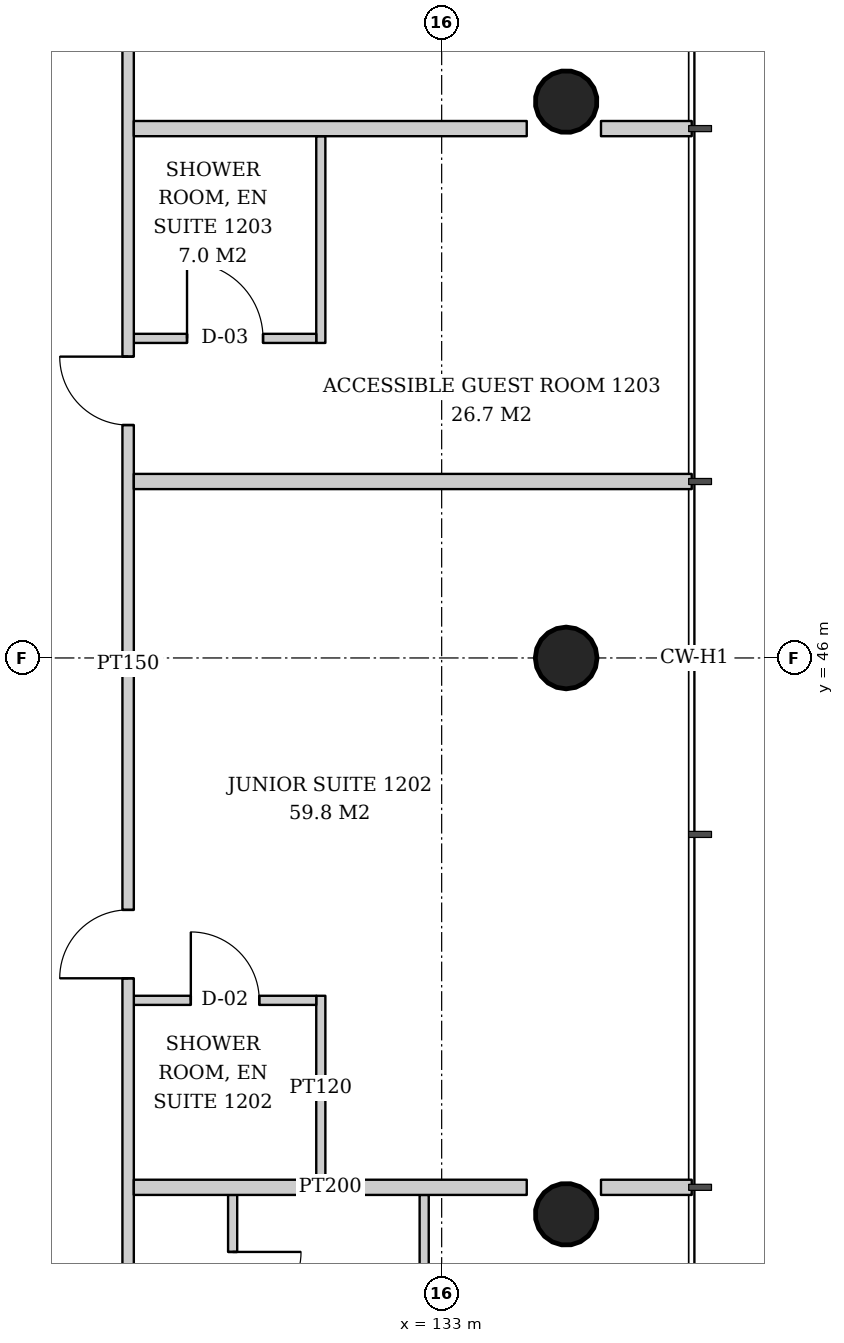
"""IFC4 building model, lengths in metres.
Left out: names, types, materials, properties, quantities, classifications, styles, units other than length and angle.
Written with IfcOpenShell. Run it as: python <this file> out.ifc"""

import sys

from ifc_helpers import new_model, si_unit, direction, frame, frame_2d, origin, origin_2d, place, context, subcontext, project, spatial, rectangle, hollow_circle, extrude, element, fill, save


model = new_model("IFC4")
c1 = context("Model", 3, precision=1e-05, world=origin(), true_north=direction((0.0, 1.0)))
c2 = subcontext(c1, "Body", "Model", "MODEL_VIEW")
j1 = project(units=[si_unit("LENGTHUNIT", "METRE"), si_unit("PLANEANGLEUNIT", "RADIAN")], contexts=[c1])
p1 = place(None, origin())
s1 = spatial("IfcSite", under=j1, at=p1, CompositionType="ELEMENT")
p2 = place(p1, origin())
s2 = spatial("IfcBuilding", under=s1, at=p2, CompositionType="ELEMENT")
p3 = place(p2, frame((0.0, 0.0, 51.4)))
s3 = spatial("IfcBuildingStorey", under=s2, at=p3, CompositionType="ELEMENT", Elevation=51.4)
p4 = place(p3, frame((134.69, 38.655, 0.0), z_axis=(-0.043059584825, 0.021497706284, 0.998841188968), x_axis=(-0.446680166538, -0.894693706707, 0.0)))
e1 = element("IfcColumn", 1, at=p4, inside=s3, PredefinedType="COLUMN", context=c2, shape_type="SweptSolid", body=[
    extrude(hollow_circle(Radius=0.406, WallThickness=0.03, at=origin_2d()), origin(), (0.0, 0.0, 1.0), 3.804),
])
p5 = place(p3, frame((134.69, 46.0, 0.0), z_axis=(-0.043069538298, 0.0, 0.999072076915), x_axis=(0.0, -1.0, 0.0)))
e2 = element("IfcColumn", 2, at=p5, inside=s3, PredefinedType="COLUMN", context=c2, shape_type="SweptSolid", body=[
    extrude(hollow_circle(Radius=0.406, WallThickness=0.03, at=origin_2d()), origin(), (0.0, 0.0, 1.0), 3.803),
])
p6 = place(p3, frame((134.69, 53.345, 0.0), z_axis=(-0.043059584825, -0.021497706284, 0.998841188968), x_axis=(0.446680166538, -0.894693706707, 0.0)))
e3 = element("IfcColumn", 3, at=p6, inside=s3, PredefinedType="COLUMN", context=c2, shape_type="SweptSolid", body=[
    extrude(hollow_circle(Radius=0.406, WallThickness=0.03, at=origin_2d()), origin(), (0.0, 0.0, 1.0), 3.804),
])
p7 = place(p3, frame((130.25, 38.936, 0.0), z_axis=(0.0, 0.0, 1.0), x_axis=(0.0, -1.0, 0.0)))
e4 = element("IfcWall", 4, at=p7, inside=s3, PredefinedType="PARTITIONING", context=c2, shape_type="SweptSolid", body=[
    extrude(rectangle(XDim=2.58, YDim=0.12, at=frame_2d((1.29, 0.0))), origin(), (0.0, 0.0, 1.0), 2.8),
])
p8 = place(p7, frame((0.75, 0.0, 0.0)))
e5 = element("IfcOpeningElement", 5, at=p8, cuts=e4, PredefinedType="OPENING", context=c2, shape_type="SweptSolid", body=[
    extrude(rectangle(XDim=0.9, YDim=2.1, at=frame_2d((0.45, 1.05))), frame((0.0, 0.07, 0.0), z_axis=(0.0, -1.0, 0.0), x_axis=(1.0, 0.0, 0.0)), (0.0, 0.0, 1.0), 0.14),
])
p9 = place(p3, frame((132.77, 38.936, 0.0), z_axis=(0.0, 0.0, 1.0), x_axis=(0.0, -1.0, 0.0)))
e6 = element("IfcWall", 6, at=p9, inside=s3, PredefinedType="PARTITIONING", context=c2, shape_type="SweptSolid", body=[
    extrude(rectangle(XDim=2.58, YDim=0.12, at=frame_2d((1.29, 0.0))), origin(), (0.0, 0.0, 1.0), 2.8),
])
p10 = place(p3, frame((131.41, 39.136, 0.0), z_axis=(0.0, 0.0, 1.0), x_axis=(0.0, 1.0, 0.0)))
e7 = element("IfcWall", 7, at=p10, inside=s3, PredefinedType="PARTITIONING", context=c2, shape_type="SweptSolid", body=[
    extrude(rectangle(XDim=2.42, YDim=0.12, at=frame_2d((1.21, 0.0))), origin(), (0.0, 0.0, 1.0), 2.847),
])
p11 = place(p3, frame((128.95, 41.496, 0.0), z_axis=(0.0, 0.0, 1.0), x_axis=(1.0, 0.0, 0.0)))
e8 = element("IfcWall", 8, at=p11, inside=s3, PredefinedType="PARTITIONING", context=c2, shape_type="SweptSolid", body=[
    extrude(rectangle(XDim=2.4, YDim=0.12, at=frame_2d((1.2, 0.0))), origin(), (0.0, 0.0, 1.0), 3.6),
])
p12 = place(p11, frame((0.75, 0.0, 0.0)))
e9 = element("IfcOpeningElement", 9, at=p12, cuts=e8, PredefinedType="OPENING", context=c2, shape_type="SweptSolid", body=[
    extrude(rectangle(XDim=0.9, YDim=2.1, at=frame_2d((0.45, 1.05))), frame((0.0, 0.07, 0.0), z_axis=(0.0, -1.0, 0.0), x_axis=(1.0, 0.0, 0.0)), (0.0, 0.0, 1.0), 0.14),
])
p13 = place(p3, frame((131.41, 50.144, 0.0), z_axis=(0.0, 0.0, 1.0), x_axis=(0.0, 1.0, 0.0)))
e10 = element("IfcWall", 10, at=p13, inside=s3, PredefinedType="PARTITIONING", context=c2, shape_type="SweptSolid", body=[
    extrude(rectangle(XDim=2.72, YDim=0.12, at=frame_2d((1.36, 0.0))), origin(), (0.0, 0.0, 1.0), 2.847),
])
p14 = place(p3, frame((128.95, 50.204, 0.0), z_axis=(0.0, 0.0, 1.0), x_axis=(1.0, 0.0, 0.0)))
e11 = element("IfcWall", 11, at=p14, inside=s3, PredefinedType="PARTITIONING", context=c2, shape_type="SweptSolid", body=[
    extrude(rectangle(XDim=2.4, YDim=0.12, at=frame_2d((1.2, 0.0))), origin(), (0.0, 0.0, 1.0), 2.847),
])
p15 = place(p14, frame((0.7, 0.0, 0.0)))
e12 = element("IfcOpeningElement", 12, at=p15, cuts=e11, PredefinedType="OPENING", context=c2, shape_type="SweptSolid", body=[
    extrude(rectangle(XDim=1.0, YDim=2.1, at=frame_2d((0.5, 1.05))), frame((0.0, 0.07, 0.0), z_axis=(0.0, -1.0, 0.0), x_axis=(1.0, 0.0, 0.0)), (0.0, 0.0, 1.0), 0.14),
])
p16 = place(p3, frame((128.875, 34.05, 0.0), z_axis=(0.0, 0.0, 1.0), x_axis=(0.0, 1.0, 0.0)))
e13 = element("IfcWall", 13, at=p16, inside=s3, PredefinedType="PARTITIONING", context=c2, shape_type="SweptSolid", body=[
    extrude(rectangle(XDim=23.75, YDim=0.15, at=frame_2d((11.875, 0.0))), origin(), (0.0, 0.0, 1.0), 2.8),
])
p17 = place(p16, frame((2.068, 0.0, 0.0)))
e14 = element("IfcOpeningElement", 14, at=p17, cuts=e13, PredefinedType="OPENING", context=c2, shape_type="SweptSolid", body=[
    extrude(rectangle(XDim=0.9, YDim=2.1, at=frame_2d((0.45, 1.05))), frame((0.0, 0.085, 0.0), z_axis=(0.0, -1.0, 0.0), x_axis=(1.0, 0.0, 0.0)), (0.0, 0.0, 1.0), 0.17),
])
p18 = place(p16, frame((7.736, 0.0, 0.0)))
e15 = element("IfcOpeningElement", 15, at=p18, cuts=e13, PredefinedType="OPENING", context=c2, shape_type="SweptSolid", body=[
    extrude(rectangle(XDim=0.9, YDim=2.1, at=frame_2d((0.45, 1.05))), frame((0.0, 0.085, 0.0), z_axis=(0.0, -1.0, 0.0), x_axis=(1.0, 0.0, 0.0)), (0.0, 0.0, 1.0), 0.17),
])
p19 = place(p16, frame((15.014, 0.0, 0.0)))
e16 = element("IfcOpeningElement", 16, at=p19, cuts=e13, PredefinedType="OPENING", context=c2, shape_type="SweptSolid", body=[
    extrude(rectangle(XDim=0.9, YDim=2.1, at=frame_2d((0.45, 1.05))), frame((0.0, 0.085, 0.0), z_axis=(0.0, -1.0, 0.0), x_axis=(1.0, 0.0, 0.0)), (0.0, 0.0, 1.0), 0.17),
])
p20 = place(p3, frame((128.95, 39.036, 0.0), z_axis=(0.0, 0.0, 1.0), x_axis=(1.0, 0.0, 0.0)))
e17 = element("IfcWall", 17, at=p20, inside=s3, PredefinedType="PARTITIONING", context=c2, shape_type="SweptSolid", body=[
    extrude(rectangle(XDim=5.169, YDim=0.2, at=frame_2d((2.585, 0.0))), origin(), (0.0, 0.0, 1.0), 3.6),
])
p21 = place(p3, frame((135.096, 39.036, 0.0), z_axis=(0.0, 0.0, 1.0), x_axis=(1.0, 0.0, 0.0)))
e18 = element("IfcWall", 18, at=p21, inside=s3, PredefinedType="PARTITIONING", context=c2, shape_type="SweptSolid", body=[
    extrude(rectangle(XDim=1.194, YDim=0.2, at=frame_2d((0.597, 0.0))), origin(), (0.0, 0.0, 1.0), 3.6),
])
p22 = place(p3, frame((128.95, 48.322, 0.0), z_axis=(0.0, 0.0, 1.0), x_axis=(1.0, 0.0, 0.0)))
e19 = element("IfcWall", 19, at=p22, inside=s3, PredefinedType="PARTITIONING", context=c2, shape_type="SweptSolid", body=[
    extrude(rectangle(XDim=7.34, YDim=0.2, at=frame_2d((3.67, 0.0))), origin(), (0.0, 0.0, 1.0), 3.05),
])
p23 = place(p3, frame((128.95, 52.964, 0.0), z_axis=(0.0, 0.0, 1.0), x_axis=(1.0, 0.0, 0.0)))
e20 = element("IfcWall", 20, at=p23, inside=s3, PredefinedType="PARTITIONING", context=c2, shape_type="SweptSolid", body=[
    extrude(rectangle(XDim=5.169, YDim=0.2, at=frame_2d((2.585, 0.0))), origin(), (0.0, 0.0, 1.0), 3.6),
])
p24 = place(p3, frame((135.096, 52.964, 0.0), z_axis=(0.0, 0.0, 1.0), x_axis=(1.0, 0.0, 0.0)))
e21 = element("IfcWall", 21, at=p24, inside=s3, PredefinedType="PARTITIONING", context=c2, shape_type="SweptSolid", body=[
    extrude(rectangle(XDim=1.194, YDim=0.2, at=frame_2d((0.597, 0.0))), origin(), (0.0, 0.0, 1.0), 3.6),
])
p25 = place(p8, origin())
e22 = element("IfcDoor", 22, at=p25, inside=s3, OperationType="SINGLE_SWING_LEFT", PredefinedType="DOOR", context=c2, shape_type="SweptSolid", body=[
    extrude(rectangle(XDim=0.9, YDim=2.1, at=frame_2d((0.45, 1.05))), frame((0.0, 0.025, 0.0), z_axis=(0.0, -1.0, 0.0), x_axis=(1.0, 0.0, 0.0)), (0.0, 0.0, 1.0), 0.05),
])
fill(e5, e22)
p26 = place(p12, origin())
e23 = element("IfcDoor", 23, at=p26, inside=s3, OperationType="SINGLE_SWING_LEFT", PredefinedType="DOOR", context=c2, shape_type="SweptSolid", body=[
    extrude(rectangle(XDim=0.9, YDim=2.1, at=frame_2d((0.45, 1.05))), frame((0.0, 0.025, 0.0), z_axis=(0.0, -1.0, 0.0), x_axis=(1.0, 0.0, 0.0)), (0.0, 0.0, 1.0), 0.05),
])
fill(e9, e23)
p27 = place(p15, origin())
e24 = element("IfcDoor", 24, at=p27, inside=s3, OperationType="SINGLE_SWING_LEFT", PredefinedType="DOOR", context=c2, shape_type="SweptSolid", body=[
    extrude(rectangle(XDim=1.0, YDim=2.1, at=frame_2d((0.5, 1.05))), frame((0.0, 0.025, 0.0), z_axis=(0.0, -1.0, 0.0), x_axis=(1.0, 0.0, 0.0)), (0.0, 0.0, 1.0), 0.05),
])
fill(e12, e24)
p28 = place(p18, origin())
e25 = element("IfcDoor", 25, at=p28, inside=s3, OperationType="SINGLE_SWING_LEFT", PredefinedType="DOOR", context=c2, shape_type="SweptSolid", body=[
    extrude(rectangle(XDim=0.9, YDim=2.1, at=frame_2d((0.45, 1.05))), frame((0.0, 0.025, 0.0), z_axis=(0.0, -1.0, 0.0), x_axis=(1.0, 0.0, 0.0)), (0.0, 0.0, 1.0), 0.05),
])
fill(e15, e25)
p29 = place(p19, origin())
e26 = element("IfcDoor", 26, at=p29, inside=s3, OperationType="SINGLE_SWING_RIGHT", PredefinedType="DOOR", context=c2, shape_type="SweptSolid", body=[
    extrude(rectangle(XDim=0.9, YDim=2.1, at=frame_2d((0.45, 1.05))), frame((0.0, 0.025, 0.0), z_axis=(0.0, -1.0, 0.0), x_axis=(1.0, 0.0, 0.0)), (0.0, 0.0, 1.0), 0.05),
])
fill(e16, e26)
save(model, sys.argv[1])
